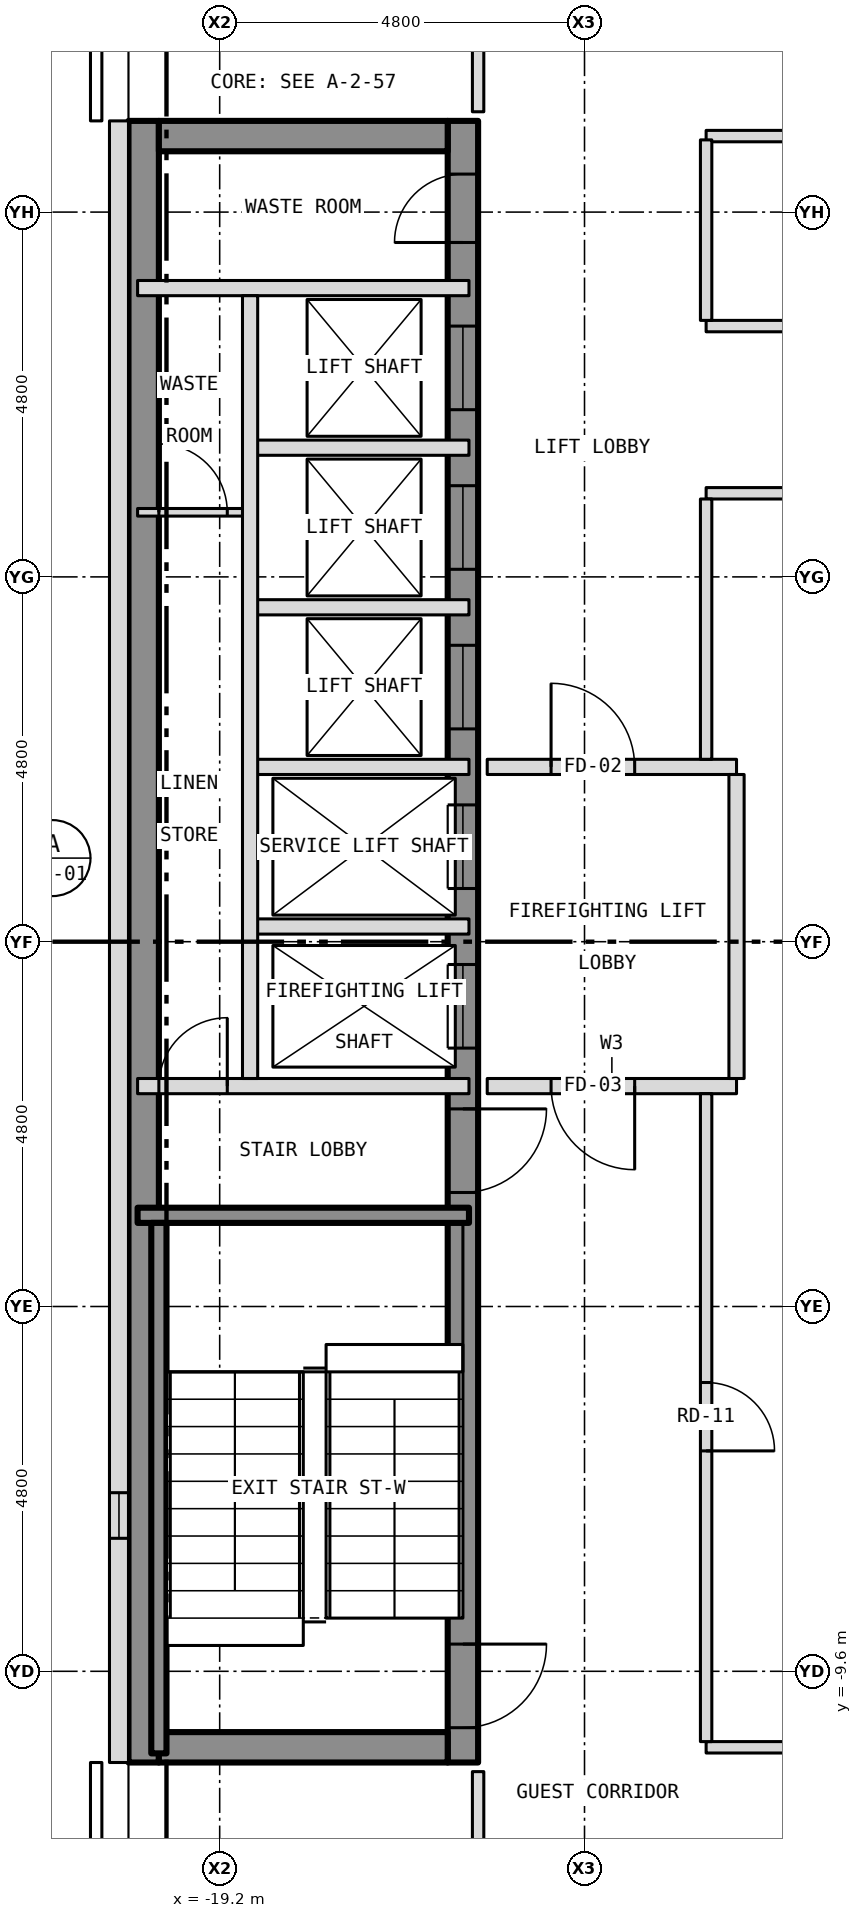
"""IFC4 building model, lengths in metres.
Left out: names, types, materials, properties, quantities, classifications, styles, units other than length and angle.
Written with IfcOpenShell. Run it as: python <this file> out.ifc"""

import sys

from ifc_helpers import new_model, si_unit, direction, frame, frame_2d, origin, place, context, subcontext, project, spatial, rectangle, extrude, element, fill, save


model = new_model("IFC4")
c1 = context("Model", 3, precision=1e-05, world=origin(), true_north=direction((0.0, 1.0)))
c2 = subcontext(c1, "Body", "Model", "MODEL_VIEW")
j1 = project(units=[si_unit("LENGTHUNIT", "METRE"), si_unit("PLANEANGLEUNIT", "RADIAN")], contexts=[c1])
p1 = place(None, origin())
s1 = spatial("IfcSite", under=j1, at=p1, CompositionType="ELEMENT")
p2 = place(p1, origin())
s2 = spatial("IfcBuilding", under=s1, at=p2, CompositionType="ELEMENT")
p3 = place(p2, frame((0.0, 0.0, 208.5)))
s3 = spatial("IfcBuildingStorey", under=s2, at=p3, CompositionType="ELEMENT", Elevation=208.5)
p4 = place(p3, frame((-16.0, -10.8, 0.0), z_axis=(0.0, 0.0, 1.0), x_axis=(0.0, 1.0, 0.0)))
e1 = element("IfcWall", 1, at=p4, inside=s3, PredefinedType="SHEAR", context=c2, shape_type="SweptSolid", body=[
    extrude(rectangle(XDim=21.6, YDim=0.4, at=frame_2d((10.8, 0.0))), origin(), (0.0, 0.0, 1.0), 3.25),
])
p5 = place(p4, frame((9.4, 0.0, 0.0)))
e2 = element("IfcOpeningElement", 2, at=p5, cuts=e1, PredefinedType="OPENING", context=c2, shape_type="SweptSolid", body=[
    extrude(rectangle(XDim=1.1, YDim=2.1, at=frame_2d((0.55, 1.05))), frame((0.0, 0.212, 0.0), z_axis=(0.0, -1.0, 0.0), x_axis=(1.0, 0.0, 0.0)), (0.0, 0.0, 1.0), 0.424),
])
p6 = place(p4, frame((11.5, 0.0, 0.0)))
e3 = element("IfcOpeningElement", 3, at=p6, cuts=e1, PredefinedType="OPENING", context=c2, shape_type="SweptSolid", body=[
    extrude(rectangle(XDim=1.1, YDim=2.1, at=frame_2d((0.55, 1.05))), frame((0.0, 0.212, 0.0), z_axis=(0.0, -1.0, 0.0), x_axis=(1.0, 0.0, 0.0)), (0.0, 0.0, 1.0), 0.424),
])
p7 = place(p4, frame((13.6, 0.0, 0.0)))
e4 = element("IfcOpeningElement", 4, at=p7, cuts=e1, PredefinedType="OPENING", context=c2, shape_type="SweptSolid", body=[
    extrude(rectangle(XDim=1.1, YDim=2.1, at=frame_2d((0.55, 1.05))), frame((0.0, 0.212, 0.0), z_axis=(0.0, -1.0, 0.0), x_axis=(1.0, 0.0, 0.0)), (0.0, 0.0, 1.0), 0.424),
])
p8 = place(p4, frame((15.7, 0.0, 0.0)))
e5 = element("IfcOpeningElement", 5, at=p8, cuts=e1, PredefinedType="OPENING", context=c2, shape_type="SweptSolid", body=[
    extrude(rectangle(XDim=1.1, YDim=2.1, at=frame_2d((0.55, 1.05))), frame((0.0, 0.212, 0.0), z_axis=(0.0, -1.0, 0.0), x_axis=(1.0, 0.0, 0.0)), (0.0, 0.0, 1.0), 0.424),
])
p9 = place(p4, frame((17.8, 0.0, 0.0)))
e6 = element("IfcOpeningElement", 6, at=p9, cuts=e1, PredefinedType="OPENING", context=c2, shape_type="SweptSolid", body=[
    extrude(rectangle(XDim=1.1, YDim=2.1, at=frame_2d((0.55, 1.05))), frame((0.0, 0.212, 0.0), z_axis=(0.0, -1.0, 0.0), x_axis=(1.0, 0.0, 0.0)), (0.0, 0.0, 1.0), 0.424),
])
p10 = place(p4, frame((0.458, 0.0, 0.0)))
e7 = element("IfcOpeningElement", 7, at=p10, cuts=e1, PredefinedType="OPENING", context=c2, shape_type="SweptSolid", body=[
    extrude(rectangle(XDim=1.1, YDim=2.1, at=frame_2d((0.55, 1.05))), frame((0.0, 0.212, 0.0), z_axis=(0.0, -1.0, 0.0), x_axis=(1.0, 0.0, 0.0)), (0.0, 0.0, 1.0), 0.424),
])
p11 = place(p4, frame((7.5, 0.0, 0.0)))
e8 = element("IfcOpeningElement", 8, at=p11, cuts=e1, PredefinedType="OPENING", context=c2, shape_type="SweptSolid", body=[
    extrude(rectangle(XDim=1.1, YDim=2.1, at=frame_2d((0.55, 1.05))), frame((0.0, 0.212, 0.0), z_axis=(0.0, -1.0, 0.0), x_axis=(1.0, 0.0, 0.0)), (0.0, 0.0, 1.0), 0.424),
])
p12 = place(p4, frame((20.0, 0.0, 0.0)))
e9 = element("IfcOpeningElement", 9, at=p12, cuts=e1, PredefinedType="OPENING", context=c2, shape_type="SweptSolid", body=[
    extrude(rectangle(XDim=0.9, YDim=2.1, at=frame_2d((0.45, 1.05))), frame((0.0, 0.212, 0.0), z_axis=(0.0, -1.0, 0.0), x_axis=(1.0, 0.0, 0.0)), (0.0, 0.0, 1.0), 0.424),
])
p13 = place(p3, frame((-20.2, -10.8, 0.0), z_axis=(0.0, 0.0, 1.0), x_axis=(0.0, 1.0, 0.0)))
e10 = element("IfcWall", 10, at=p13, inside=s3, PredefinedType="SHEAR", context=c2, shape_type="SweptSolid", body=[
    extrude(rectangle(XDim=21.6, YDim=0.4, at=frame_2d((10.8, 0.0))), origin(), (0.0, 0.0, 1.0), 3.25),
])
for number, where, z_axis, x_axis in (
    (11, (-20.0, 10.6, 0.0), (0.0, 0.0, 1.0), (1.0, 0.0, 0.0)),
    (12, (-20.0, -10.6, 0.0), (0.0, 0.0, 1.0), (1.0, 0.0, 0.0)),
):
    element("IfcWall", number, at=place(p3, frame(where, z_axis=z_axis, x_axis=x_axis)), inside=s3, PredefinedType="SHEAR", context=c2, shape_type="SweptSolid", body=[
        extrude(rectangle(XDim=3.8, YDim=0.4, at=frame_2d((1.9, 0.0))), origin(), (0.0, 0.0, 1.0), 3.25),
    ])
p14 = place(p3, frame((-20.525, 10.8, 0.0), z_axis=(0.0, 0.0, 1.0), x_axis=(0.0, -1.0, 0.0)))
e13 = element("IfcWall", 13, at=p14, inside=s3, PredefinedType="SOLIDWALL", context=c2, shape_type="SweptSolid", body=[
    extrude(rectangle(XDim=21.6, YDim=0.25, at=frame_2d((10.8, 0.0))), origin(), (0.0, 0.0, 1.0), 3.5),
])
p15 = place(p14, frame((18.05, 0.0, 1.0)))
e14 = element("IfcOpeningElement", 14, at=p15, cuts=e13, PredefinedType="OPENING", context=c2, shape_type="SweptSolid", body=[
    extrude(rectangle(XDim=0.6, YDim=1.5, at=frame_2d((0.3, 0.75))), frame((0.0, 0.137, 0.0), z_axis=(0.0, -1.0, 0.0), x_axis=(1.0, 0.0, 0.0)), (0.0, 0.0, 1.0), 0.274),
])
p16 = place(p3, frame((-12.8, -10.6, 0.0), z_axis=(0.0, 0.0, 1.0), x_axis=(1.0, 0.0, 0.0)))
e15 = element("IfcWall", 15, at=p16, inside=s3, PredefinedType="PARTITIONING", context=c2, shape_type="SweptSolid", body=[
    extrude(rectangle(XDim=13.9, YDim=0.15, at=frame_2d((6.95, 0.0))), origin(), (0.0, 0.0, 1.0), 3.35),
])
p17 = place(p3, frame((-20.28, -3.6, 0.0), z_axis=(0.0, 0.0, 1.0), x_axis=(1.0, 0.0, 0.0)))
e16 = element("IfcWall", 16, at=p17, inside=s3, PredefinedType="SHEAR", context=c2, shape_type="SweptSolid", body=[
    extrude(rectangle(XDim=4.36, YDim=0.2, at=frame_2d((2.18, 0.0))), origin(), (0.0, 0.0, 1.0), 3.25),
])
p18 = place(p3, frame((-20.28, -1.9, 0.0), z_axis=(0.0, 0.0, 1.0), x_axis=(1.0, 0.0, 0.0)))
e17 = element("IfcWall", 17, at=p18, inside=s3, PredefinedType="PARTITIONING", context=c2, shape_type="SweptSolid", body=[
    extrude(rectangle(XDim=4.36, YDim=0.2, at=frame_2d((2.18, 0.0))), origin(), (0.0, 0.0, 1.0), 3.25),
])
p19 = place(p18, frame((0.28, 0.0, 0.0)))
e18 = element("IfcOpeningElement", 18, at=p19, cuts=e17, PredefinedType="OPENING", context=c2, shape_type="SweptSolid", body=[
    extrude(rectangle(XDim=0.9, YDim=2.1, at=frame_2d((0.45, 1.05))), frame((0.0, 0.112, 0.0), z_axis=(0.0, -1.0, 0.0), x_axis=(1.0, 0.0, 0.0)), (0.0, 0.0, 1.0), 0.224),
])
p20 = place(p3, frame((-15.68, -1.9, 0.0), z_axis=(0.0, 0.0, 1.0), x_axis=(1.0, 0.0, 0.0)))
e19 = element("IfcWall", 19, at=p20, inside=s3, PredefinedType="PARTITIONING", context=c2, shape_type="SweptSolid", body=[
    extrude(rectangle(XDim=3.28, YDim=0.2, at=frame_2d((1.64, 0.0))), origin(), (0.0, 0.0, 1.0), 3.35),
])
p21 = place(p20, frame((0.84, 0.0, 0.0)))
e20 = element("IfcOpeningElement", 20, at=p21, cuts=e19, PredefinedType="OPENING", context=c2, shape_type="SweptSolid", body=[
    extrude(rectangle(XDim=1.1, YDim=2.1, at=frame_2d((0.55, 1.05))), frame((0.0, 0.112, 0.0), z_axis=(0.0, -1.0, 0.0), x_axis=(1.0, 0.0, 0.0)), (0.0, 0.0, 1.0), 0.224),
])
for number, where, z_axis, x_axis in (
    (21, (-18.8, 0.2, 0.0), (0.0, 0.0, 1.0), (1.0, 0.0, 0.0)),
    (22, (-18.8, 2.3, 0.0), (0.0, 0.0, 1.0), (1.0, 0.0, 0.0)),
):
    element("IfcWall", number, at=place(p3, frame(where, z_axis=z_axis, x_axis=x_axis)), inside=s3, PredefinedType="PARTITIONING", context=c2, shape_type="SweptSolid", body=[
        extrude(rectangle(XDim=2.88, YDim=0.2, at=frame_2d((1.44, 0.0))), origin(), (0.0, 0.0, 1.0), 3.25),
    ])
p22 = place(p3, frame((-15.68, 2.3, 0.0), z_axis=(0.0, 0.0, 1.0), x_axis=(1.0, 0.0, 0.0)))
e23 = element("IfcWall", 23, at=p22, inside=s3, PredefinedType="PARTITIONING", context=c2, shape_type="SweptSolid", body=[
    extrude(rectangle(XDim=3.28, YDim=0.2, at=frame_2d((1.64, 0.0))), origin(), (0.0, 0.0, 1.0), 3.35),
])
p23 = place(p22, frame((0.84, 0.0, 0.0)))
e24 = element("IfcOpeningElement", 24, at=p23, cuts=e23, PredefinedType="OPENING", context=c2, shape_type="SweptSolid", body=[
    extrude(rectangle(XDim=1.1, YDim=2.1, at=frame_2d((0.55, 1.05))), frame((0.0, 0.112, 0.0), z_axis=(0.0, -1.0, 0.0), x_axis=(1.0, 0.0, 0.0)), (0.0, 0.0, 1.0), 0.224),
])
p24 = place(p3, frame((-18.8, 4.4, 0.0), z_axis=(0.0, 0.0, 1.0), x_axis=(1.0, 0.0, 0.0)))
e25 = element("IfcWall", 25, at=p24, inside=s3, PredefinedType="PARTITIONING", context=c2, shape_type="SweptSolid", body=[
    extrude(rectangle(XDim=2.88, YDim=0.2, at=frame_2d((1.44, 0.0))), origin(), (0.0, 0.0, 1.0), 3.25),
])
p25 = place(p3, frame((-20.28, 5.65, 0.0), z_axis=(0.0, 0.0, 1.0), x_axis=(1.0, 0.0, 0.0)))
e26 = element("IfcWall", 26, at=p25, inside=s3, PredefinedType="PARTITIONING", context=c2, shape_type="SweptSolid", body=[
    extrude(rectangle(XDim=1.48, YDim=0.1, at=frame_2d((0.74, 0.0))), origin(), (0.0, 0.0, 1.0), 3.25),
])
p26 = place(p25, frame((0.28, 0.0, 0.0)))
e27 = element("IfcOpeningElement", 27, at=p26, cuts=e26, PredefinedType="OPENING", context=c2, shape_type="SweptSolid", body=[
    extrude(rectangle(XDim=0.9, YDim=2.1, at=frame_2d((0.45, 1.05))), frame((0.0, 0.062, 0.0), z_axis=(0.0, -1.0, 0.0), x_axis=(1.0, 0.0, 0.0)), (0.0, 0.0, 1.0), 0.124),
])
p27 = place(p3, frame((-12.8, 5.9, 0.0), z_axis=(0.0, 0.0, 1.0), x_axis=(1.0, 0.0, 0.0)))
e28 = element("IfcWall", 28, at=p27, inside=s3, PredefinedType="PARTITIONING", context=c2, shape_type="SweptSolid", body=[
    extrude(rectangle(XDim=13.9, YDim=0.15, at=frame_2d((6.95, 0.0))), origin(), (0.0, 0.0, 1.0), 3.35),
])
p28 = place(p3, frame((-18.8, 6.5, 0.0), z_axis=(0.0, 0.0, 1.0), x_axis=(1.0, 0.0, 0.0)))
e29 = element("IfcWall", 29, at=p28, inside=s3, PredefinedType="PARTITIONING", context=c2, shape_type="SweptSolid", body=[
    extrude(rectangle(XDim=2.88, YDim=0.2, at=frame_2d((1.44, 0.0))), origin(), (0.0, 0.0, 1.0), 3.25),
])
p29 = place(p3, frame((-12.8, 8.1, 0.0), z_axis=(0.0, 0.0, 1.0), x_axis=(1.0, 0.0, 0.0)))
e30 = element("IfcWall", 30, at=p29, inside=s3, PredefinedType="PARTITIONING", context=c2, shape_type="SweptSolid", body=[
    extrude(rectangle(XDim=13.9, YDim=0.15, at=frame_2d((6.95, 0.0))), origin(), (0.0, 0.0, 1.0), 3.35),
])
p30 = place(p3, frame((-20.28, 8.6, 0.0), z_axis=(0.0, 0.0, 1.0), x_axis=(1.0, 0.0, 0.0)))
e31 = element("IfcWall", 31, at=p30, inside=s3, PredefinedType="PARTITIONING", context=c2, shape_type="SweptSolid", body=[
    extrude(rectangle(XDim=4.36, YDim=0.2, at=frame_2d((2.18, 0.0))), origin(), (0.0, 0.0, 1.0), 3.25),
])
p31 = place(p3, frame((-12.8, 10.6, 0.0), z_axis=(0.0, 0.0, 1.0), x_axis=(1.0, 0.0, 0.0)))
e32 = element("IfcWall", 32, at=p31, inside=s3, PredefinedType="PARTITIONING", context=c2, shape_type="SweptSolid", body=[
    extrude(rectangle(XDim=13.9, YDim=0.15, at=frame_2d((6.95, 0.0))), origin(), (0.0, 0.0, 1.0), 3.35),
])
p32 = place(p31, frame((8.1, 0.0, 0.0)))
e33 = element("IfcOpeningElement", 33, at=p32, cuts=e32, PredefinedType="OPENING", context=c2, shape_type="SweptSolid", body=[
    extrude(rectangle(XDim=0.9, YDim=2.1, at=frame_2d((0.45, 1.05))), frame((0.0, 0.087, 0.0), z_axis=(0.0, -1.0, 0.0), x_axis=(1.0, 0.0, 0.0)), (0.0, 0.0, 1.0), 0.174),
])
p33 = place(p3, frame((-20.0, -10.68, 0.0), z_axis=(0.0, 0.0, 1.0), x_axis=(0.0, 1.0, 0.0)))
e34 = element("IfcWall", 34, at=p33, inside=s3, PredefinedType="SHEAR", context=c2, shape_type="SweptSolid", body=[
    extrude(rectangle(XDim=6.98, YDim=0.2, at=frame_2d((3.49, 0.0))), origin(), (0.0, 0.0, 1.0), 3.25),
])
p34 = place(p3, frame((-18.8, -1.8, 0.0), z_axis=(0.0, 0.0, 1.0), x_axis=(0.0, 1.0, 0.0)))
e35 = element("IfcWall", 35, at=p34, inside=s3, PredefinedType="PARTITIONING", context=c2, shape_type="SweptSolid", body=[
    extrude(rectangle(XDim=10.3, YDim=0.2, at=frame_2d((5.15, 0.0))), origin(), (0.0, 0.0, 1.0), 3.25),
])
for number, where, z_axis, x_axis in (
    (36, (-15.8, -12.725, 0.0), (0.0, 0.0, 1.0), (0.0, 1.0, 0.0)),
    (37, (-15.8, 10.92, 0.0), (0.0, 0.0, 1.0), (0.0, 1.0, 0.0)),
):
    element("IfcWall", number, at=place(p3, frame(where, z_axis=z_axis, x_axis=x_axis)), inside=s3, PredefinedType="PARTITIONING", context=c2, shape_type="SweptSolid", body=[
        extrude(rectangle(XDim=1.805, YDim=0.15, at=frame_2d((0.903, 0.0))), origin(), (0.0, 0.0, 1.0), 3.35),
    ])
p35 = place(p3, frame((-12.8, -10.525, 0.0), z_axis=(0.0, 0.0, 1.0), x_axis=(0.0, 1.0, 0.0)))
e38 = element("IfcWall", 38, at=p35, inside=s3, PredefinedType="PARTITIONING", context=c2, shape_type="SweptSolid", body=[
    extrude(rectangle(XDim=8.525, YDim=0.15, at=frame_2d((4.262, 0.0))), origin(), (0.0, 0.0, 1.0), 3.35),
])
p36 = place(p35, frame((3.825, 0.0, 0.0)))
e39 = element("IfcOpeningElement", 39, at=p36, cuts=e38, PredefinedType="OPENING", context=c2, shape_type="SweptSolid", body=[
    extrude(rectangle(XDim=0.9, YDim=2.1, at=frame_2d((0.45, 1.05))), frame((0.0, 0.087, 0.0), z_axis=(0.0, -1.0, 0.0), x_axis=(1.0, 0.0, 0.0)), (0.0, 0.0, 1.0), 0.174),
])
p37 = place(p3, frame((-12.8, 2.4, 0.0), z_axis=(0.0, 0.0, 1.0), x_axis=(0.0, 1.0, 0.0)))
e40 = element("IfcWall", 40, at=p37, inside=s3, PredefinedType="PARTITIONING", context=c2, shape_type="SweptSolid", body=[
    extrude(rectangle(XDim=3.425, YDim=0.15, at=frame_2d((1.712, 0.0))), origin(), (0.0, 0.0, 1.0), 3.35),
])
p38 = place(p3, frame((-12.8, 8.175, 0.0), z_axis=(0.0, 0.0, 1.0), x_axis=(0.0, 1.0, 0.0)))
e41 = element("IfcWall", 41, at=p38, inside=s3, PredefinedType="PARTITIONING", context=c2, shape_type="SweptSolid", body=[
    extrude(rectangle(XDim=2.375, YDim=0.15, at=frame_2d((1.188, 0.0))), origin(), (0.0, 0.0, 1.0), 3.35),
])
p39 = place(p3, frame((-12.4, -1.8, 0.0), z_axis=(0.0, 0.0, 1.0), x_axis=(0.0, 1.0, 0.0)))
e42 = element("IfcWall", 42, at=p39, inside=s3, PredefinedType="PARTITIONING", context=c2, shape_type="SweptSolid", body=[
    extrude(rectangle(XDim=4.0, YDim=0.2, at=frame_2d((2.0, 0.0))), origin(), (0.0, 0.0, 1.0), 3.35),
])
p40 = place(p15, origin())
e43 = element("IfcWindow", 43, at=p40, inside=s3, PartitioningType="SINGLE_PANEL", PredefinedType="WINDOW", context=c2, shape_type="SweptSolid", body=[
    extrude(rectangle(XDim=0.6, YDim=1.5, at=frame_2d((0.3, 0.75))), frame((0.0, -0.035, 0.0), z_axis=(0.0, -1.0, 0.0), x_axis=(1.0, 0.0, 0.0)), (0.0, 0.0, 1.0), 0.06),
])
fill(e14, e43)
p41 = place(p5, origin())
e44 = element("IfcDoor", 44, at=p41, inside=s3, OperationType="SLIDING_TO_LEFT", PredefinedType="DOOR", context=c2, shape_type="SweptSolid", body=[
    extrude(rectangle(XDim=1.1, YDim=2.1, at=frame_2d((0.55, 1.05))), frame((0.0, 0.025, 0.0), z_axis=(0.0, -1.0, 0.0), x_axis=(1.0, 0.0, 0.0)), (0.0, 0.0, 1.0), 0.05),
])
fill(e2, e44)
p42 = place(p6, origin())
e45 = element("IfcDoor", 45, at=p42, inside=s3, OperationType="SLIDING_TO_LEFT", PredefinedType="DOOR", context=c2, shape_type="SweptSolid", body=[
    extrude(rectangle(XDim=1.1, YDim=2.1, at=frame_2d((0.55, 1.05))), frame((0.0, 0.025, 0.0), z_axis=(0.0, -1.0, 0.0), x_axis=(1.0, 0.0, 0.0)), (0.0, 0.0, 1.0), 0.05),
])
fill(e3, e45)
p43 = place(p7, origin())
e46 = element("IfcDoor", 46, at=p43, inside=s3, OperationType="SLIDING_TO_LEFT", PredefinedType="DOOR", context=c2, shape_type="SweptSolid", body=[
    extrude(rectangle(XDim=1.1, YDim=2.1, at=frame_2d((0.55, 1.05))), frame((0.0, 0.025, 0.0), z_axis=(0.0, -1.0, 0.0), x_axis=(1.0, 0.0, 0.0)), (0.0, 0.0, 1.0), 0.05),
])
fill(e4, e46)
p44 = place(p8, origin())
e47 = element("IfcDoor", 47, at=p44, inside=s3, OperationType="SLIDING_TO_LEFT", PredefinedType="DOOR", context=c2, shape_type="SweptSolid", body=[
    extrude(rectangle(XDim=1.1, YDim=2.1, at=frame_2d((0.55, 1.05))), frame((0.0, 0.025, 0.0), z_axis=(0.0, -1.0, 0.0), x_axis=(1.0, 0.0, 0.0)), (0.0, 0.0, 1.0), 0.05),
])
fill(e5, e47)
p45 = place(p9, origin())
e48 = element("IfcDoor", 48, at=p45, inside=s3, OperationType="SLIDING_TO_LEFT", PredefinedType="DOOR", context=c2, shape_type="SweptSolid", body=[
    extrude(rectangle(XDim=1.1, YDim=2.1, at=frame_2d((0.55, 1.05))), frame((0.0, 0.025, 0.0), z_axis=(0.0, -1.0, 0.0), x_axis=(1.0, 0.0, 0.0)), (0.0, 0.0, 1.0), 0.05),
])
fill(e6, e48)
p46 = place(p10, origin())
e49 = element("IfcDoor", 49, at=p46, inside=s3, OperationType="SINGLE_SWING_RIGHT", PredefinedType="DOOR", context=c2, shape_type="SweptSolid", body=[
    extrude(rectangle(XDim=1.1, YDim=2.1, at=frame_2d((0.55, 1.05))), frame((0.0, 0.025, 0.0), z_axis=(0.0, -1.0, 0.0), x_axis=(1.0, 0.0, 0.0)), (0.0, 0.0, 1.0), 0.05),
])
fill(e7, e49)
p47 = place(p11, origin())
e50 = element("IfcDoor", 50, at=p47, inside=s3, OperationType="SINGLE_SWING_RIGHT", PredefinedType="DOOR", context=c2, shape_type="SweptSolid", body=[
    extrude(rectangle(XDim=1.1, YDim=2.1, at=frame_2d((0.55, 1.05))), frame((0.0, 0.025, 0.0), z_axis=(0.0, -1.0, 0.0), x_axis=(1.0, 0.0, 0.0)), (0.0, 0.0, 1.0), 0.05),
])
fill(e8, e50)
p48 = place(p12, origin())
e51 = element("IfcDoor", 51, at=p48, inside=s3, OperationType="SINGLE_SWING_LEFT", PredefinedType="DOOR", context=c2, shape_type="SweptSolid", body=[
    extrude(rectangle(XDim=0.9, YDim=2.1, at=frame_2d((0.45, 1.05))), frame((0.0, 0.025, 0.0), z_axis=(0.0, -1.0, 0.0), x_axis=(1.0, 0.0, 0.0)), (0.0, 0.0, 1.0), 0.05),
])
fill(e9, e51)
p49 = place(p19, origin())
e52 = element("IfcDoor", 52, at=p49, inside=s3, OperationType="SINGLE_SWING_RIGHT", PredefinedType="DOOR", context=c2, shape_type="SweptSolid", body=[
    extrude(rectangle(XDim=0.9, YDim=2.1, at=frame_2d((0.45, 1.05))), frame((0.0, 0.025, 0.0), z_axis=(0.0, -1.0, 0.0), x_axis=(1.0, 0.0, 0.0)), (0.0, 0.0, 1.0), 0.05),
])
fill(e18, e52)
p50 = place(p26, origin())
e53 = element("IfcDoor", 53, at=p50, inside=s3, OperationType="SINGLE_SWING_LEFT", PredefinedType="DOOR", context=c2, shape_type="SweptSolid", body=[
    extrude(rectangle(XDim=0.9, YDim=2.1, at=frame_2d((0.45, 1.05))), frame((0.0, 0.025, 0.0), z_axis=(0.0, -1.0, 0.0), x_axis=(1.0, 0.0, 0.0)), (0.0, 0.0, 1.0), 0.05),
])
fill(e27, e53)
p51 = place(p23, origin())
e54 = element("IfcDoor", 54, at=p51, inside=s3, OperationType="SINGLE_SWING_LEFT", PredefinedType="DOOR", context=c2, shape_type="SweptSolid", body=[
    extrude(rectangle(XDim=1.1, YDim=2.1, at=frame_2d((0.55, 1.05))), frame((0.0, 0.025, 0.0), z_axis=(0.0, -1.0, 0.0), x_axis=(1.0, 0.0, 0.0)), (0.0, 0.0, 1.0), 0.05),
])
fill(e24, e54)
p52 = place(p21, origin())
e55 = element("IfcDoor", 55, at=p52, inside=s3, OperationType="SINGLE_SWING_RIGHT", PredefinedType="DOOR", context=c2, shape_type="SweptSolid", body=[
    extrude(rectangle(XDim=1.1, YDim=2.1, at=frame_2d((0.55, 1.05))), frame((0.0, 0.025, 0.0), z_axis=(0.0, -1.0, 0.0), x_axis=(1.0, 0.0, 0.0)), (0.0, 0.0, 1.0), 0.05),
])
fill(e20, e55)
p53 = place(p36, origin())
e56 = element("IfcDoor", 56, at=p53, inside=s3, OperationType="SINGLE_SWING_LEFT", PredefinedType="DOOR", context=c2, shape_type="SweptSolid", body=[
    extrude(rectangle(XDim=0.9, YDim=2.1, at=frame_2d((0.45, 1.05))), frame((0.0, 0.025, 0.0), z_axis=(0.0, -1.0, 0.0), x_axis=(1.0, 0.0, 0.0)), (0.0, 0.0, 1.0), 0.05),
])
fill(e39, e56)
save(model, sys.argv[1])
